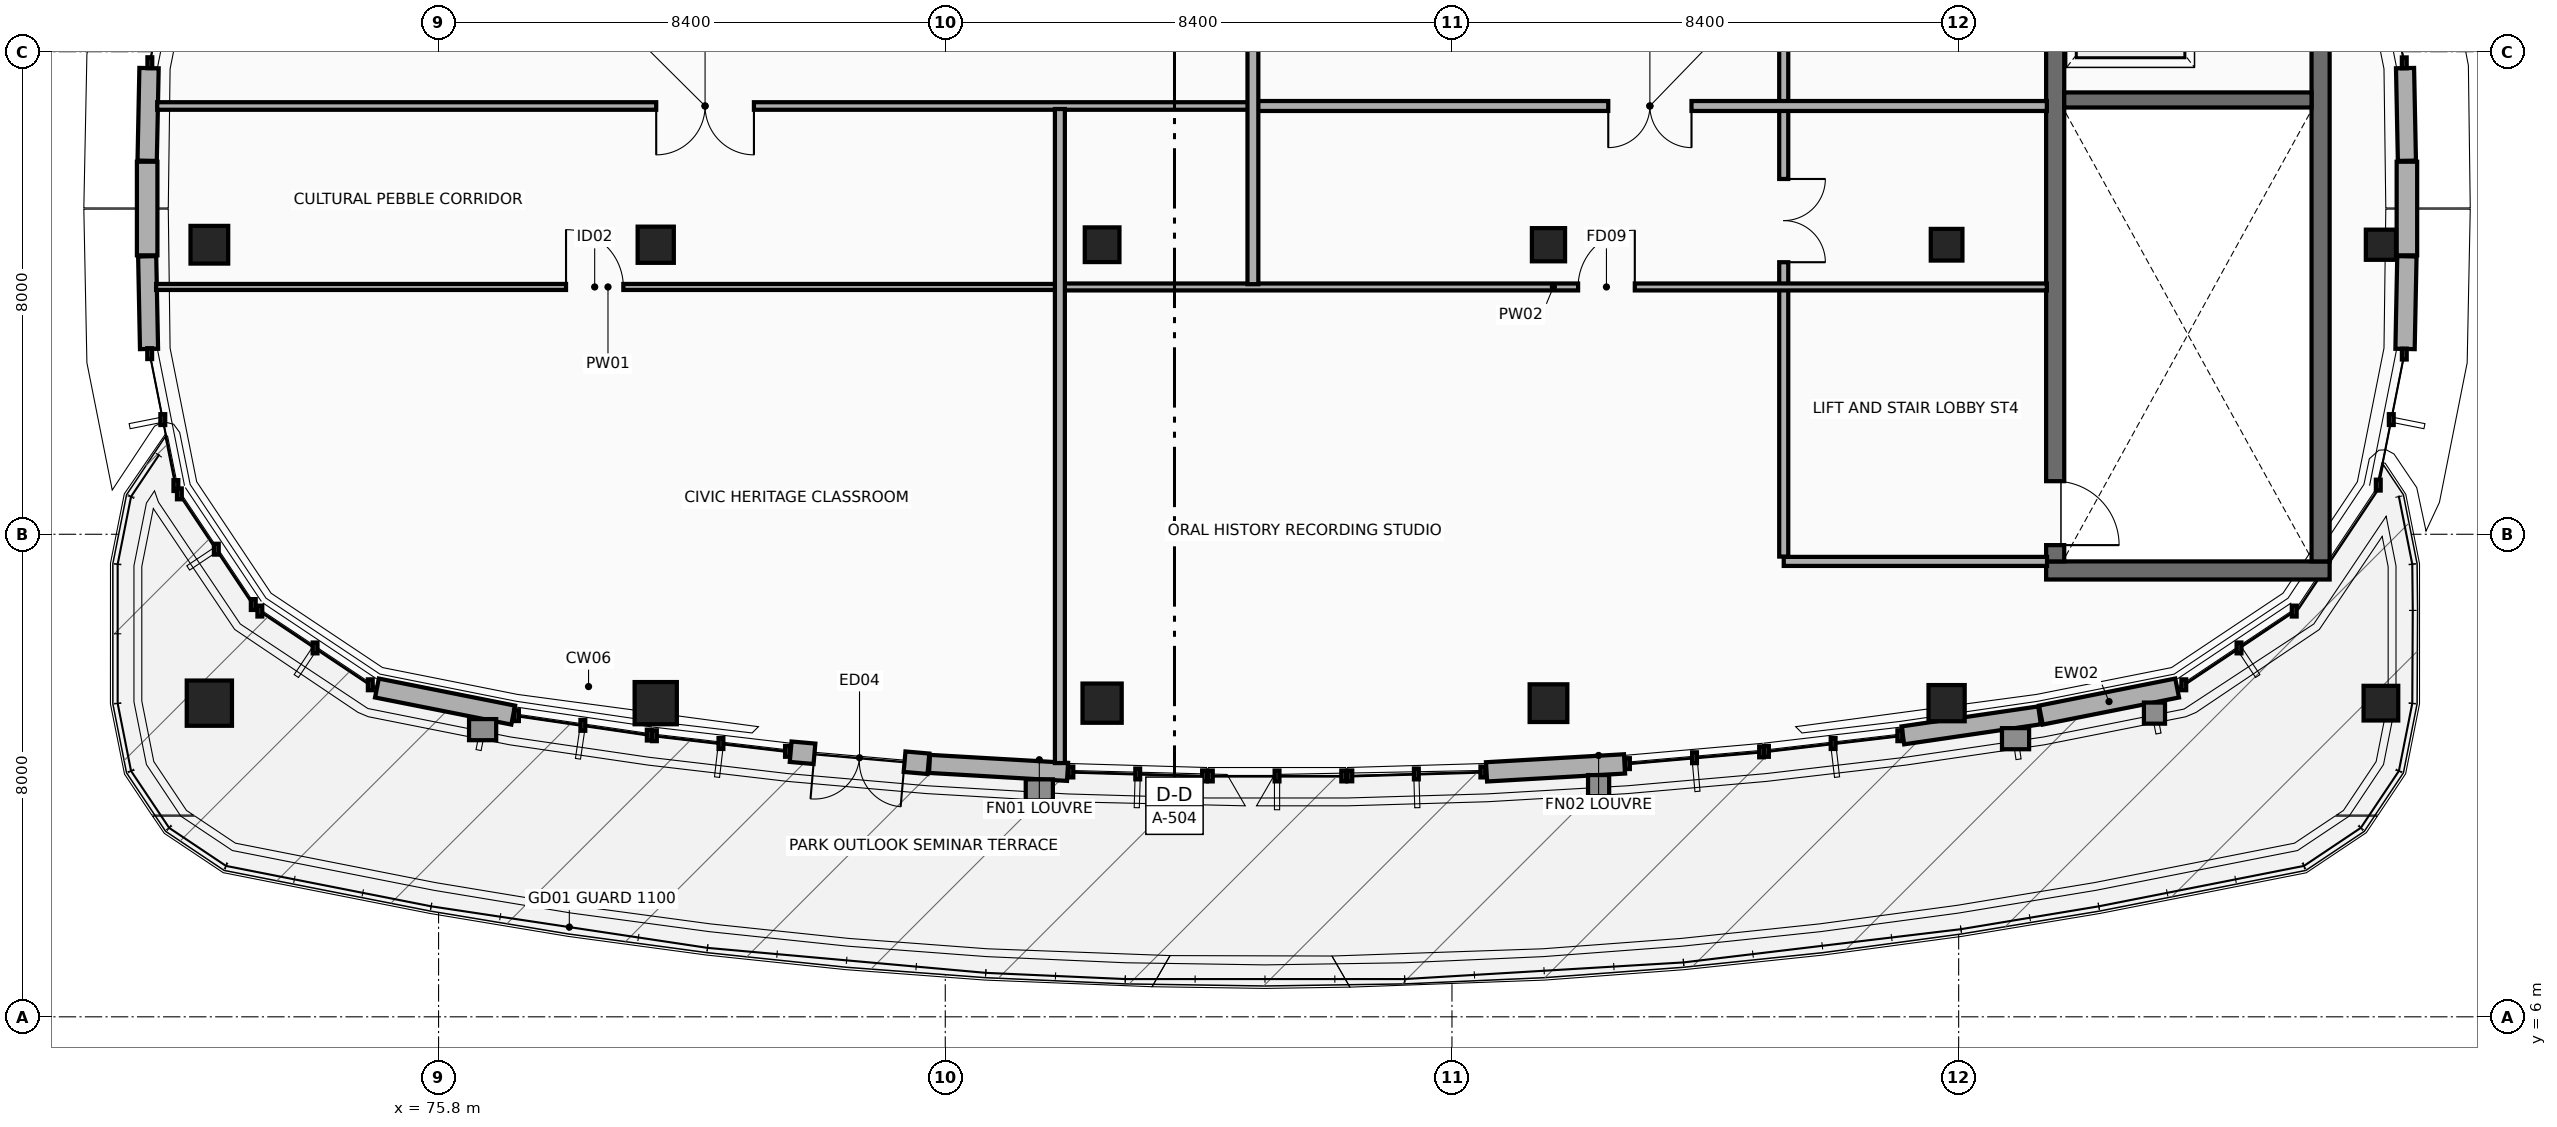
"""IFC4 building model, lengths in metres.
Left out: names, types, materials, properties, quantities, classifications, styles, units other than length and angle.
Written with IfcOpenShell. Run it as: python <this file> out.ifc"""

import sys

from ifc_helpers import new_model, si_unit, direction, frame, frame_2d, origin, origin_2d, place, context, subcontext, project, spatial, rectangle, extrude, element, fill, save


model = new_model("IFC4")
c1 = context("Model", 3, precision=1e-05, world=origin(), true_north=direction((0.0, 1.0)))
c2 = subcontext(c1, "Body", "Model", "MODEL_VIEW")
j1 = project(units=[si_unit("LENGTHUNIT", "METRE"), si_unit("PLANEANGLEUNIT", "RADIAN")], contexts=[c1])
p1 = place(None, origin())
s1 = spatial("IfcSite", under=j1, at=p1, CompositionType="ELEMENT")
p2 = place(p1, origin())
s2 = spatial("IfcBuilding", under=s1, at=p2, CompositionType="ELEMENT")
p3 = place(p2, frame((0.0, 0.0, 8.7)))
s3 = spatial("IfcBuildingStorey", under=s2, at=p3, CompositionType="ELEMENT", Elevation=8.7)
p4 = place(p3, frame((102.45, 13.4, 0.0), z_axis=(0.0, 0.0, 1.0), x_axis=(1.0, 0.0, 0.0)))
e1 = element("IfcWall", 1, at=p4, inside=s3, PredefinedType="SHEAR", context=c2, shape_type="SweptSolid", body=[
    extrude(rectangle(XDim=4.7, YDim=0.3, at=frame_2d((2.35, 0.0))), origin(), (0.0, 0.0, 1.0), 3.9),
])
p5 = place(p3, frame((107.0, 13.55, 0.0), z_axis=(0.0, 0.0, 1.0), x_axis=(0.0, 1.0, 0.0)))
e2 = element("IfcWall", 2, at=p5, inside=s3, PredefinedType="SHEAR", context=c2, shape_type="SweptSolid", body=[
    extrude(rectangle(XDim=11.3, YDim=0.3, at=frame_2d((5.65, 0.0))), origin(), (0.0, 0.0, 1.0), 3.9),
])
p6 = place(p3, frame((102.6, 24.85, 0.0), z_axis=(0.0, 0.0, 1.0), x_axis=(0.0, -1.0, 0.0)))
e3 = element("IfcWall", 3, at=p6, inside=s3, PredefinedType="SHEAR", context=c2, shape_type="SweptSolid", body=[
    extrude(rectangle(XDim=11.3, YDim=0.3, at=frame_2d((5.65, 0.0))), origin(), (0.0, 0.0, 1.0), 3.9),
])
p7 = place(p6, frame((1.1, 0.0, 0.0)))
e4 = element("IfcOpeningElement", 4, at=p7, cuts=e3, PredefinedType="OPENING", context=c2, shape_type="SweptSolid", body=[
    extrude(rectangle(XDim=1.3, YDim=2.25, at=frame_2d((0.65, 1.125))), frame((0.0, 0.16, 0.0), z_axis=(0.0, -1.0, 0.0), x_axis=(1.0, 0.0, 0.0)), (0.0, 0.0, 1.0), 0.32),
])
p8 = place(p6, frame((9.97, 0.0, 0.0)))
e5 = element("IfcOpeningElement", 5, at=p8, cuts=e3, PredefinedType="OPENING", context=c2, shape_type="SweptSolid", body=[
    extrude(rectangle(XDim=1.06, YDim=2.15, at=frame_2d((0.53, 1.075))), frame((0.0, 0.16, 0.0), z_axis=(0.0, -1.0, 0.0), x_axis=(1.0, 0.0, 0.0)), (0.0, 0.0, 1.0), 0.32),
])
p9 = place(p3, frame((102.75, 21.2, 0.0), z_axis=(0.0, 0.0, 1.0), x_axis=(1.0, 0.0, 0.0)))
e6 = element("IfcWall", 6, at=p9, inside=s3, PredefinedType="SHEAR", context=c2, shape_type="SweptSolid", body=[
    extrude(rectangle(XDim=4.1, YDim=0.25, at=frame_2d((2.05, 0.0))), origin(), (0.0, 0.0, 1.0), 3.9),
])
p10 = place(p3, frame((72.0, 11.2, 0.0), z_axis=(0.0, 0.0, 1.0), x_axis=(1.0, 0.0, 0.0)))
e7 = element("IfcColumn", 7, at=p10, inside=s3, PredefinedType="COLUMN", context=c2, shape_type="SweptSolid", body=[
    extrude(rectangle(XDim=0.75, YDim=0.75, at=origin_2d()), origin(), (0.0, 0.0, 1.0), 3.9),
])
p11 = place(p3, frame((72.0, 18.8, 0.0), z_axis=(0.0, 0.0, 1.0), x_axis=(1.0, 0.0, 0.0)))
e8 = element("IfcColumn", 8, at=p11, inside=s3, PredefinedType="COLUMN", context=c2, shape_type="SweptSolid", body=[
    extrude(rectangle(XDim=0.625, YDim=0.625, at=origin_2d()), origin(), (0.0, 0.0, 1.0), 3.9),
])
p12 = place(p3, frame((79.4, 11.2, 0.0), z_axis=(0.0, 0.0, 1.0), x_axis=(1.0, 0.0, 0.0)))
e9 = element("IfcColumn", 9, at=p12, inside=s3, PredefinedType="COLUMN", context=c2, shape_type="SweptSolid", body=[
    extrude(rectangle(XDim=0.7, YDim=0.7, at=origin_2d()), origin(), (0.0, 0.0, 1.0), 3.9),
])
p13 = place(p3, frame((79.4, 18.8, 0.0), z_axis=(0.0, 0.0, 1.0), x_axis=(1.0, 0.0, 0.0)))
e10 = element("IfcColumn", 10, at=p13, inside=s3, PredefinedType="COLUMN", context=c2, shape_type="SweptSolid", body=[
    extrude(rectangle(XDim=0.6, YDim=0.6, at=origin_2d()), origin(), (0.0, 0.0, 1.0), 3.9),
])
p14 = place(p3, frame((86.8, 11.2, 0.0), z_axis=(0.0, 0.0, 1.0), x_axis=(1.0, 0.0, 0.0)))
e11 = element("IfcColumn", 11, at=p14, inside=s3, PredefinedType="COLUMN", context=c2, shape_type="SweptSolid", body=[
    extrude(rectangle(XDim=0.65, YDim=0.65, at=origin_2d()), origin(), (0.0, 0.0, 1.0), 3.9),
])
p15 = place(p3, frame((86.8, 18.8, 0.0), z_axis=(0.0, 0.0, 1.0), x_axis=(1.0, 0.0, 0.0)))
e12 = element("IfcColumn", 12, at=p15, inside=s3, PredefinedType="COLUMN", context=c2, shape_type="SweptSolid", body=[
    extrude(rectangle(XDim=0.575, YDim=0.575, at=origin_2d()), origin(), (0.0, 0.0, 1.0), 3.9),
])
p16 = place(p3, frame((94.2, 11.2, 0.0), z_axis=(0.0, 0.0, 1.0), x_axis=(1.0, 0.0, 0.0)))
e13 = element("IfcColumn", 13, at=p16, inside=s3, PredefinedType="COLUMN", context=c2, shape_type="SweptSolid", body=[
    extrude(rectangle(XDim=0.625, YDim=0.625, at=origin_2d()), origin(), (0.0, 0.0, 1.0), 3.9),
])
p17 = place(p3, frame((94.2, 18.8, 0.0), z_axis=(0.0, 0.0, 1.0), x_axis=(1.0, 0.0, 0.0)))
e14 = element("IfcColumn", 14, at=p17, inside=s3, PredefinedType="COLUMN", context=c2, shape_type="SweptSolid", body=[
    extrude(rectangle(XDim=0.55, YDim=0.55, at=origin_2d()), origin(), (0.0, 0.0, 1.0), 3.9),
])
p18 = place(p3, frame((100.8, 11.2, 0.0), z_axis=(0.0, 0.0, 1.0), x_axis=(1.0, 0.0, 0.0)))
e15 = element("IfcColumn", 15, at=p18, inside=s3, PredefinedType="COLUMN", context=c2, shape_type="SweptSolid", body=[
    extrude(rectangle(XDim=0.6, YDim=0.6, at=origin_2d()), origin(), (0.0, 0.0, 1.0), 3.9),
])
p19 = place(p3, frame((100.8, 18.8, 0.0), z_axis=(0.0, 0.0, 1.0), x_axis=(1.0, 0.0, 0.0)))
e16 = element("IfcColumn", 16, at=p19, inside=s3, PredefinedType="COLUMN", context=c2, shape_type="SweptSolid", body=[
    extrude(rectangle(XDim=0.525, YDim=0.525, at=origin_2d()), origin(), (0.0, 0.0, 1.0), 3.9),
])
p20 = place(p3, frame((108.0, 11.2, 0.0), z_axis=(0.0, 0.0, 1.0), x_axis=(1.0, 0.0, 0.0)))
e17 = element("IfcColumn", 17, at=p20, inside=s3, PredefinedType="COLUMN", context=c2, shape_type="SweptSolid", body=[
    extrude(rectangle(XDim=0.575, YDim=0.575, at=origin_2d()), origin(), (0.0, 0.0, 1.0), 3.9),
])
p21 = place(p3, frame((108.0, 18.8, 0.0), z_axis=(0.0, 0.0, 1.0), x_axis=(1.0, 0.0, 0.0)))
e18 = element("IfcColumn", 18, at=p21, inside=s3, PredefinedType="COLUMN", context=c2, shape_type="SweptSolid", body=[
    extrude(rectangle(XDim=0.5, YDim=0.5, at=origin_2d()), origin(), (0.0, 0.0, 1.0), 3.9),
])
p22 = place(p3, frame((83.921, 10.195, 0.0), z_axis=(0.0, 0.0, 1.0), x_axis=(-0.996189670926, 0.087213184446, 0.0)))
e19 = element("IfcWall", 19, at=p22, inside=s3, PredefinedType="STANDARD", context=c2, shape_type="SweptSolid", body=[
    extrude(rectangle(XDim=2.293, YDim=0.34, at=frame_2d((1.146, 0.0))), origin(), (0.0, 0.0, 1.0), 3.664),
])
p23 = place(p22, frame((0.397, 0.0, 0.0)))
e20 = element("IfcOpeningElement", 20, at=p23, cuts=e19, PredefinedType="OPENING", context=c2, shape_type="SweptSolid", body=[
    extrude(rectangle(XDim=1.5, YDim=2.3, at=frame_2d((0.75, 1.15))), frame((0.0, 0.18, 0.0), z_axis=(0.0, -1.0, 0.0), x_axis=(1.0, 0.0, 0.0)), (0.0, 0.0, 1.0), 0.36),
])
p24 = place(p3, frame((86.227, 10.061, 0.0), z_axis=(0.0, 0.0, 1.0), x_axis=(-0.998338056465, 0.05762920279, 0.0)))
e21 = element("IfcWall", 21, at=p24, inside=s3, PredefinedType="STANDARD", context=c2, shape_type="SweptSolid", body=[
    extrude(rectangle(XDim=2.292, YDim=0.3, at=frame_2d((1.146, 0.0))), origin(), (0.0, 0.0, 1.0), 3.664),
])
p25 = place(p3, frame((95.461, 10.193, 0.0), z_axis=(0.0, 0.0, 1.0), x_axis=(-0.998337702631, -0.057635332101, 0.0)))
e22 = element("IfcWall", 22, at=p25, inside=s3, PredefinedType="STANDARD", context=c2, shape_type="SweptSolid", body=[
    extrude(rectangle(XDim=2.292, YDim=0.32, at=frame_2d((1.146, 0.0))), origin(), (0.0, 0.0, 1.0), 3.243),
])
p26 = place(p3, frame((102.341, 10.998, 0.0), z_axis=(0.0, 0.0, 1.0), x_axis=(-0.989435718954, -0.144972266513, 0.0)))
e23 = element("IfcWall", 23, at=p26, inside=s3, PredefinedType="STANDARD", context=c2, shape_type="SweptSolid", body=[
    extrude(rectangle(XDim=2.29, YDim=0.3, at=frame_2d((1.145, 0.0))), origin(), (0.0, 0.0, 1.0), 3.187),
])
p27 = place(p3, frame((104.622, 11.451, 0.0), z_axis=(0.0, 0.0, 1.0), x_axis=(-0.980816424084, -0.194933686792, 0.0)))
e24 = element("IfcWall", 24, at=p27, inside=s3, PredefinedType="STANDARD", context=c2, shape_type="SweptSolid", body=[
    extrude(rectangle(XDim=2.303, YDim=0.32, at=frame_2d((1.152, 0.0))), origin(), (0.0, 0.0, 1.0), 3.187),
])
p28 = place(p3, frame((108.431, 18.608, 0.0), z_axis=(0.0, 0.0, 1.0), x_axis=(-0.0201834572, -0.99979629328, 0.0)))
e25 = element("IfcWall", 25, at=p28, inside=s3, PredefinedType="STANDARD", context=c2, shape_type="SweptSolid", body=[
    extrude(rectangle(XDim=1.536, YDim=0.32, at=frame_2d((0.768, 0.0))), origin(), (0.0, 0.0, 1.0), 3.664),
])
p29 = place(p3, frame((108.431, 20.176, 0.0), z_axis=(0.0, 0.0, 1.0), x_axis=(0.0, -1.0, 0.0)))
e26 = element("IfcWall", 26, at=p29, inside=s3, PredefinedType="STANDARD", context=c2, shape_type="SweptSolid", body=[
    extrude(rectangle(XDim=1.552, YDim=0.34, at=frame_2d((0.776, 0.0))), origin(), (0.0, 0.0, 1.0), 3.243),
])
p30 = place(p3, frame((108.4, 21.728, 0.0), z_axis=(0.0, 0.0, 1.0), x_axis=(0.02018025071, -0.999796358006, 0.0)))
e27 = element("IfcWall", 27, at=p30, inside=s3, PredefinedType="STANDARD", context=c2, shape_type="SweptSolid", body=[
    extrude(rectangle(XDim=1.536, YDim=0.3, at=frame_2d((0.768, 0.0))), origin(), (0.0, 0.0, 1.0), 3.664),
])
p31 = place(p3, frame((70.969, 20.192, 0.0), z_axis=(0.0, 0.0, 1.0), x_axis=(0.02018025071, 0.999796358006, 0.0)))
e28 = element("IfcWall", 28, at=p31, inside=s3, PredefinedType="STANDARD", context=c2, shape_type="SweptSolid", body=[
    extrude(rectangle(XDim=1.536, YDim=0.32, at=frame_2d((0.768, 0.0))), origin(), (0.0, 0.0, 1.0), 3.664),
])
p32 = place(p3, frame((70.969, 18.624, 0.0), z_axis=(0.0, 0.0, 1.0), x_axis=(0.0, 1.0, 0.0)))
e29 = element("IfcWall", 29, at=p32, inside=s3, PredefinedType="STANDARD", context=c2, shape_type="SweptSolid", body=[
    extrude(rectangle(XDim=1.552, YDim=0.34, at=frame_2d((0.776, 0.0))), origin(), (0.0, 0.0, 1.0), 3.243),
])
p33 = place(p3, frame((71.0, 17.072, 0.0), z_axis=(0.0, 0.0, 1.0), x_axis=(-0.0201834572, 0.99979629328, 0.0)))
e30 = element("IfcWall", 30, at=p33, inside=s3, PredefinedType="STANDARD", context=c2, shape_type="SweptSolid", body=[
    extrude(rectangle(XDim=1.536, YDim=0.3, at=frame_2d((0.768, 0.0))), origin(), (0.0, 0.0, 1.0), 3.664),
])
p34 = place(p3, frame((77.037, 11.002, 0.0), z_axis=(0.0, 0.0, 1.0), x_axis=(-0.980816424084, 0.194933686792, 0.0)))
e31 = element("IfcWall", 31, at=p34, inside=s3, PredefinedType="STANDARD", context=c2, shape_type="SweptSolid", body=[
    extrude(rectangle(XDim=2.303, YDim=0.32, at=frame_2d((1.152, 0.0))), origin(), (0.0, 0.0, 1.0), 3.242),
])
p35 = place(p3, frame((98.1, 13.55, 0.0), z_axis=(0.0, 0.0, 1.0), x_axis=(1.0, 0.0, 0.0)))
e32 = element("IfcWall", 32, at=p35, inside=s3, PredefinedType="PARTITIONING", context=c2, shape_type="SweptSolid", body=[
    extrude(rectangle(XDim=4.365, YDim=0.15, at=frame_2d((2.183, 0.0))), origin(), (0.0, 0.0, 1.0), 3.0),
])
p36 = place(p3, frame((98.1, 24.77, 0.0), z_axis=(0.0, 0.0, 1.0), x_axis=(0.0, -1.0, 0.0)))
e33 = element("IfcWall", 33, at=p36, inside=s3, PredefinedType="PARTITIONING", context=c2, shape_type="SweptSolid", body=[
    extrude(rectangle(XDim=11.14, YDim=0.15, at=frame_2d((5.57, 0.0))), origin(), (0.0, 0.0, 1.0), 3.187),
])
p37 = place(p36, frame((4.88, 0.0, 0.0)))
e34 = element("IfcOpeningElement", 34, at=p37, cuts=e33, PredefinedType="OPENING", context=c2, shape_type="SweptSolid", body=[
    extrude(rectangle(XDim=1.38, YDim=2.2, at=frame_2d((0.69, 1.1))), frame((0.0, 0.085, 0.0), z_axis=(0.0, -1.0, 0.0), x_axis=(1.0, 0.0, 0.0)), (0.0, 0.0, 1.0), 0.17),
])
p38 = place(p3, frame((71.117, 18.1, 0.0), z_axis=(0.0, 0.0, 1.0), x_axis=(1.0, 0.0, 0.0)))
e35 = element("IfcWall", 35, at=p38, inside=s3, PredefinedType="PARTITIONING", context=c2, shape_type="SweptSolid", body=[
    extrude(rectangle(XDim=14.983, YDim=0.1, at=frame_2d((7.492, 0.0))), origin(), (0.0, 0.0, 1.0), 3.075),
])
p39 = place(p38, frame((6.796, 0.0, 0.0)))
e36 = element("IfcOpeningElement", 36, at=p39, cuts=e35, PredefinedType="OPENING", context=c2, shape_type="SweptSolid", body=[
    extrude(rectangle(XDim=0.95, YDim=2.11, at=frame_2d((0.475, 1.055))), frame((0.0, 0.06, 0.0), z_axis=(0.0, -1.0, 0.0), x_axis=(1.0, 0.0, 0.0)), (0.0, 0.0, 1.0), 0.12),
])
p40 = place(p3, frame((86.1, 18.1, 0.0), z_axis=(0.0, 0.0, 1.0), x_axis=(1.0, 0.0, 0.0)))
e37 = element("IfcWall", 37, at=p40, inside=s3, PredefinedType="PARTITIONING", context=c2, shape_type="SweptSolid", body=[
    extrude(rectangle(XDim=16.362, YDim=0.115, at=frame_2d((8.181, 0.0))), origin(), (0.0, 0.0, 1.0), 3.0),
])
p41 = place(p40, frame((8.591, 0.0, 0.0)))
e38 = element("IfcOpeningElement", 38, at=p41, cuts=e37, PredefinedType="OPENING", context=c2, shape_type="SweptSolid", body=[
    extrude(rectangle(XDim=0.94, YDim=2.1, at=frame_2d((0.47, 1.05))), frame((0.0, 0.067, 0.0), z_axis=(0.0, -1.0, 0.0), x_axis=(1.0, 0.0, 0.0)), (0.0, 0.0, 1.0), 0.135),
])
p42 = place(p3, frame((89.3, 21.1, 0.0), z_axis=(0.0, 0.0, 1.0), x_axis=(-1.0, 0.0, 0.0)))
e39 = element("IfcWall", 39, at=p42, inside=s3, PredefinedType="PARTITIONING", context=c2, shape_type="SweptSolid", body=[
    extrude(rectangle(XDim=18.165, YDim=0.125, at=frame_2d((9.083, 0.0))), origin(), (0.0, 0.0, 1.0), 3.025),
])
p43 = place(p42, frame((8.272, 0.0, 0.0)))
e40 = element("IfcOpeningElement", 40, at=p43, cuts=e39, PredefinedType="OPENING", context=c2, shape_type="SweptSolid", body=[
    extrude(rectangle(XDim=1.62, YDim=2.32, at=frame_2d((0.81, 1.16))), frame((0.0, 0.073, 0.0), z_axis=(0.0, -1.0, 0.0), x_axis=(1.0, 0.0, 0.0)), (0.0, 0.0, 1.0), 0.145),
])
p44 = place(p3, frame((102.462, 21.1, 0.0), z_axis=(0.0, 0.0, 1.0), x_axis=(-1.0, 0.0, 0.0)))
e41 = element("IfcWall", 41, at=p44, inside=s3, PredefinedType="PARTITIONING", context=c2, shape_type="SweptSolid", body=[
    extrude(rectangle(XDim=13.162, YDim=0.165, at=frame_2d((6.581, 0.0))), origin(), (0.0, 0.0, 1.0), 2.95),
])
p45 = place(p44, frame((5.891, 0.0, 0.0)))
e42 = element("IfcOpeningElement", 42, at=p45, cuts=e41, PredefinedType="OPENING", context=c2, shape_type="SweptSolid", body=[
    extrude(rectangle(XDim=1.38, YDim=2.2, at=frame_2d((0.69, 1.1))), frame((0.0, 0.093, 0.0), z_axis=(0.0, -1.0, 0.0), x_axis=(1.0, 0.0, 0.0)), (0.0, 0.0, 1.0), 0.185),
])
p46 = place(p3, frame((86.1, 10.207, 0.0), z_axis=(0.0, 0.0, 1.0), x_axis=(0.0, 1.0, 0.0)))
e43 = element("IfcWall", 43, at=p46, inside=s3, PredefinedType="PARTITIONING", context=c2, shape_type="SweptSolid", body=[
    extrude(rectangle(XDim=10.843, YDim=0.165, at=frame_2d((5.421, 0.0))), origin(), (0.0, 0.0, 1.0), 3.194),
])
p47 = place(p3, frame((89.3, 18.146, 0.0), z_axis=(0.0, 0.0, 1.0), x_axis=(0.0, 1.0, 0.0)))
e44 = element("IfcWall", 44, at=p47, inside=s3, PredefinedType="PARTITIONING", context=c2, shape_type="SweptSolid", body=[
    extrude(rectangle(XDim=10.503, YDim=0.18, at=frame_2d((5.251, 0.0))), origin(), (0.0, 0.0, 1.0), 3.187),
])
p48 = place(p23, origin())
e45 = element("IfcDoor", 45, at=p48, inside=s3, OperationType="DOUBLE_DOOR_SINGLE_SWING", PredefinedType="DOOR", context=c2, shape_type="SweptSolid", body=[
    extrude(rectangle(XDim=1.5, YDim=2.3, at=frame_2d((0.75, 1.15))), frame((0.0, 0.025, 0.0), z_axis=(0.0, -1.0, 0.0), x_axis=(1.0, 0.0, 0.0)), (0.0, 0.0, 1.0), 0.05),
])
fill(e20, e45)
p49 = place(p8, origin())
e46 = element("IfcDoor", 46, at=p49, inside=s3, OperationType="SINGLE_SWING_RIGHT", PredefinedType="DOOR", context=c2, shape_type="SweptSolid", body=[
    extrude(rectangle(XDim=1.06, YDim=2.15, at=frame_2d((0.53, 1.075))), frame((0.0, 0.025, 0.0), z_axis=(0.0, -1.0, 0.0), x_axis=(1.0, 0.0, 0.0)), (0.0, 0.0, 1.0), 0.05),
])
fill(e5, e46)
p50 = place(p37, origin())
e47 = element("IfcDoor", 47, at=p50, inside=s3, OperationType="DOUBLE_DOOR_SINGLE_SWING", PredefinedType="DOOR", context=c2, shape_type="SweptSolid", body=[
    extrude(rectangle(XDim=1.38, YDim=2.2, at=frame_2d((0.69, 1.1))), frame((0.0, 0.025, 0.0), z_axis=(0.0, -1.0, 0.0), x_axis=(1.0, 0.0, 0.0)), (0.0, 0.0, 1.0), 0.05),
])
fill(e34, e47)
p51 = place(p39, origin())
e48 = element("IfcDoor", 48, at=p51, inside=s3, OperationType="SINGLE_SWING_LEFT", PredefinedType="DOOR", context=c2, shape_type="SweptSolid", body=[
    extrude(rectangle(XDim=0.95, YDim=2.11, at=frame_2d((0.475, 1.055))), frame((0.0, 0.025, 0.0), z_axis=(0.0, -1.0, 0.0), x_axis=(1.0, 0.0, 0.0)), (0.0, 0.0, 1.0), 0.05),
])
fill(e36, e48)
p52 = place(p41, origin())
e49 = element("IfcDoor", 49, at=p52, inside=s3, OperationType="SINGLE_SWING_RIGHT", PredefinedType="DOOR", context=c2, shape_type="SweptSolid", body=[
    extrude(rectangle(XDim=0.94, YDim=2.1, at=frame_2d((0.47, 1.05))), frame((0.0, 0.025, 0.0), z_axis=(0.0, -1.0, 0.0), x_axis=(1.0, 0.0, 0.0)), (0.0, 0.0, 1.0), 0.05),
])
fill(e38, e49)
p53 = place(p43, origin())
e50 = element("IfcDoor", 50, at=p53, inside=s3, OperationType="DOUBLE_DOOR_SINGLE_SWING", PredefinedType="DOOR", context=c2, shape_type="SweptSolid", body=[
    extrude(rectangle(XDim=1.62, YDim=2.32, at=frame_2d((0.81, 1.16))), frame((0.0, 0.025, 0.0), z_axis=(0.0, -1.0, 0.0), x_axis=(1.0, 0.0, 0.0)), (0.0, 0.0, 1.0), 0.05),
])
fill(e40, e50)
p54 = place(p45, origin())
e51 = element("IfcDoor", 51, at=p54, inside=s3, OperationType="DOUBLE_DOOR_SINGLE_SWING", PredefinedType="DOOR", context=c2, shape_type="SweptSolid", body=[
    extrude(rectangle(XDim=1.38, YDim=2.2, at=frame_2d((0.69, 1.1))), frame((0.0, 0.025, 0.0), z_axis=(0.0, -1.0, 0.0), x_axis=(1.0, 0.0, 0.0)), (0.0, 0.0, 1.0), 0.05),
])
fill(e42, e51)
save(model, sys.argv[1])
